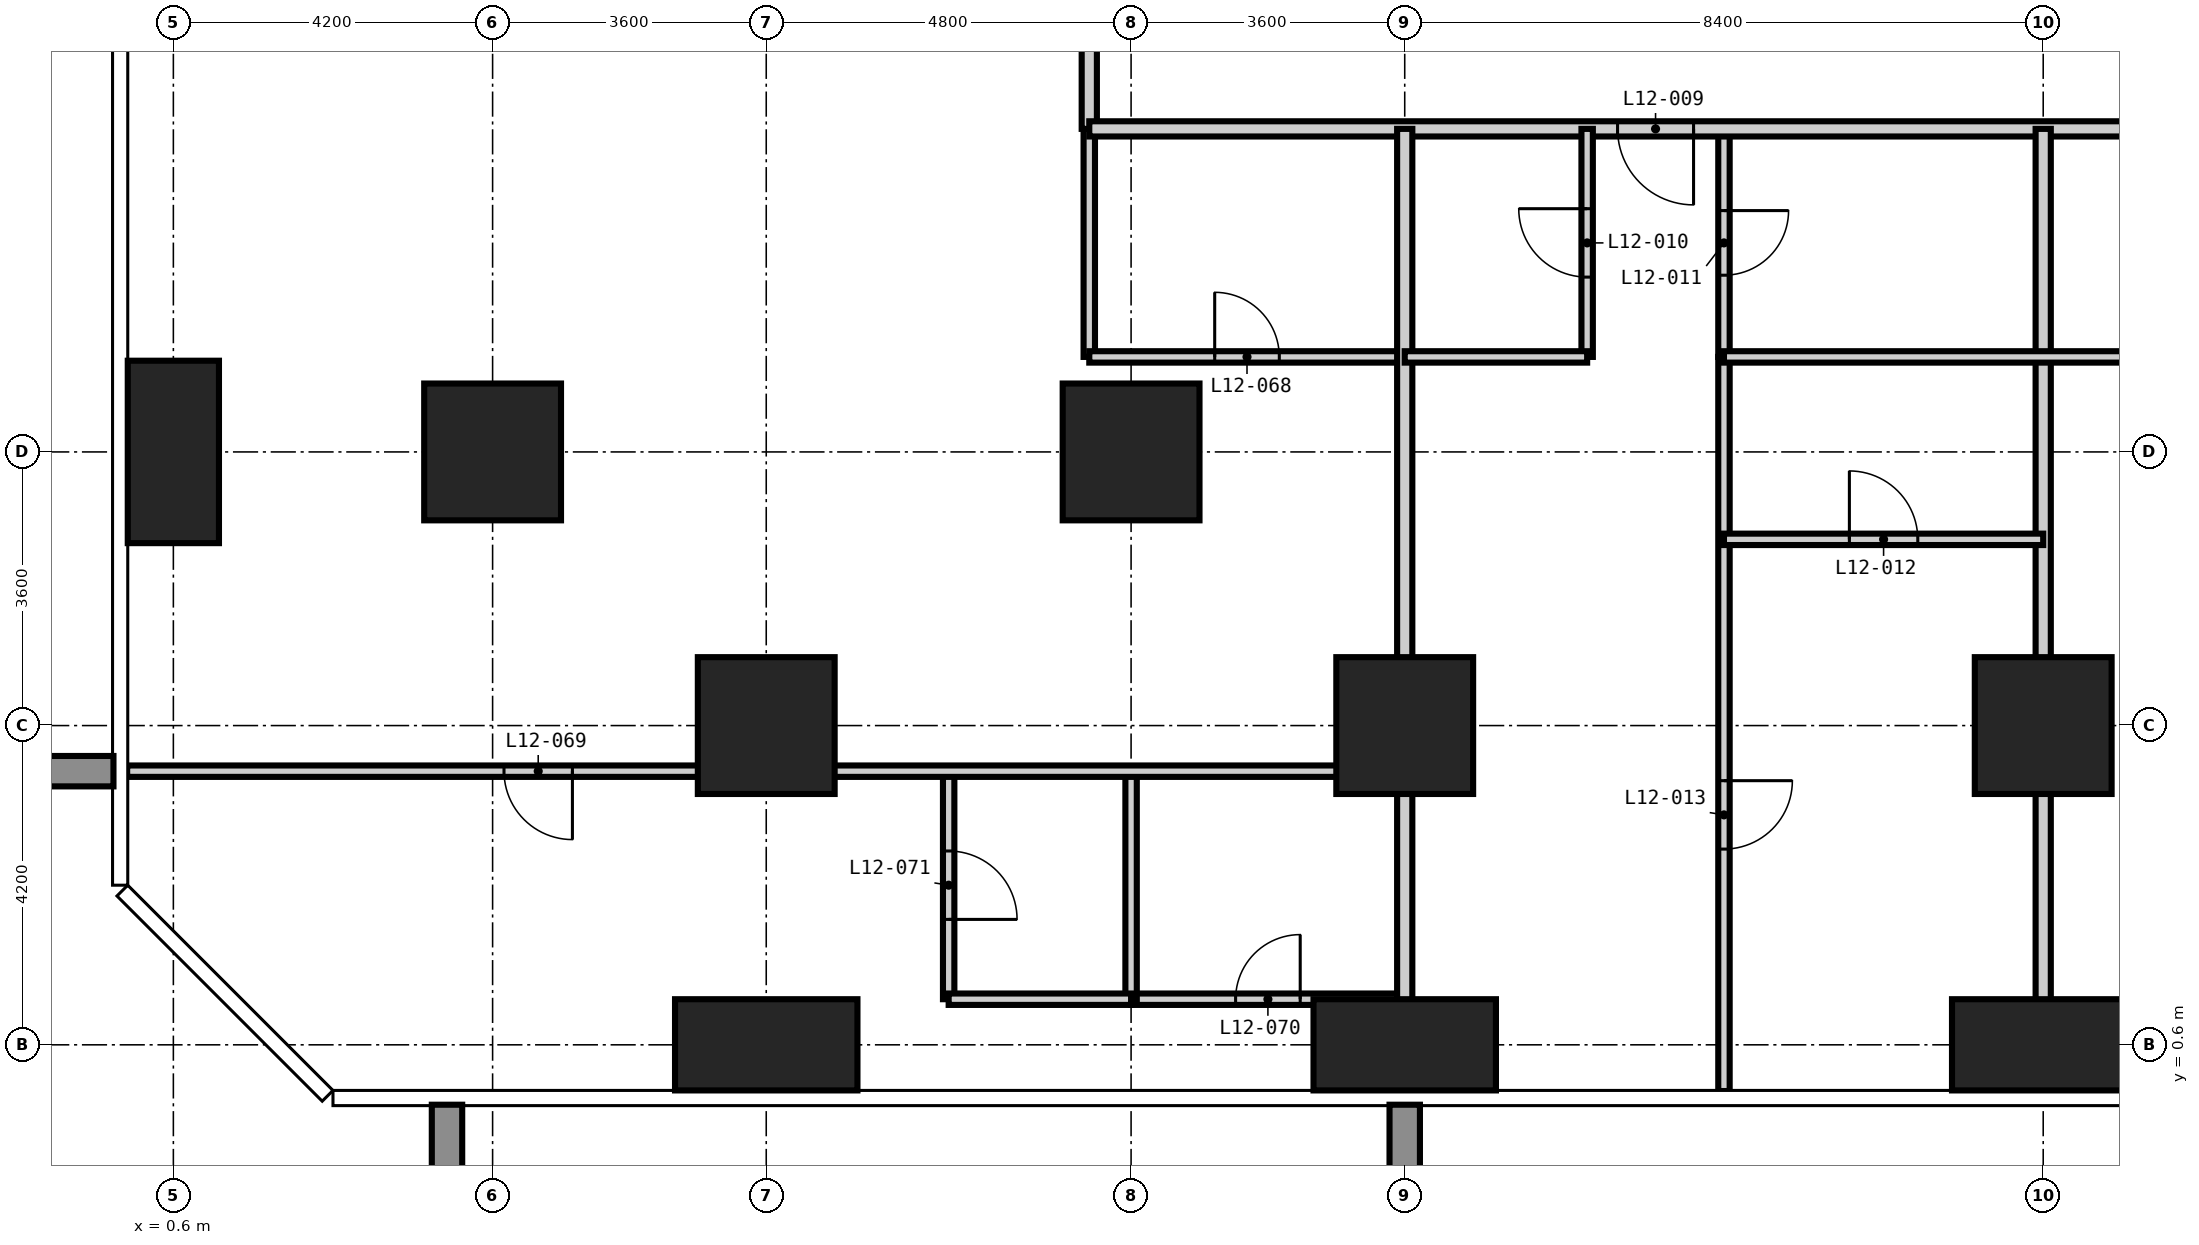
"""IFC4 building model, lengths in metres.
Left out: names, types, materials, properties, quantities, classifications, styles, units other than length and angle.
Written with IfcOpenShell. Run it as: python <this file> out.ifc"""

import sys

from ifc_helpers import new_model, si_unit, direction, frame, frame_2d, origin, origin_2d, place, context, subcontext, project, spatial, rectangle, extrude, element, fill, save


model = new_model("IFC4")
c1 = context("Model", 3, precision=1e-05, world=origin(), true_north=direction((0.0, 1.0)))
c2 = subcontext(c1, "Body", "Model", "MODEL_VIEW")
j1 = project(units=[si_unit("LENGTHUNIT", "METRE"), si_unit("PLANEANGLEUNIT", "RADIAN")], contexts=[c1])
p1 = place(None, origin())
s1 = spatial("IfcSite", under=j1, at=p1, CompositionType="ELEMENT")
p2 = place(p1, origin())
s2 = spatial("IfcBuilding", under=s1, at=p2, CompositionType="ELEMENT")
p3 = place(p2, frame((0.0, 0.0, 52.2)))
s3 = spatial("IfcBuildingStorey", under=s2, at=p3, CompositionType="ELEMENT", Elevation=52.2)
p4 = place(p3, frame((0.6, 8.4, -0.35), z_axis=(0.0, 0.0, 1.0), x_axis=(1.0, 0.0, 0.0)))
e1 = element("IfcColumn", 1, at=p4, inside=s3, PredefinedType="COLUMN", context=c2, shape_type="SweptSolid", body=[
    extrude(rectangle(XDim=1.2, YDim=2.4, at=origin_2d()), origin(), (0.0, 0.0, 1.0), 3.6),
])
p5 = place(p3, frame((4.8, 8.4, -0.35), z_axis=(0.0, 0.0, 1.0), x_axis=(1.0, 0.0, 0.0)))
e2 = element("IfcColumn", 2, at=p5, inside=s3, PredefinedType="COLUMN", context=c2, shape_type="SweptSolid", body=[
    extrude(rectangle(XDim=1.8, YDim=1.8, at=origin_2d()), origin(), (0.0, 0.0, 1.0), 3.6),
])
p6 = place(p3, frame((8.4, 0.6, -0.35), z_axis=(0.0, 0.0, 1.0), x_axis=(1.0, 0.0, 0.0)))
e3 = element("IfcColumn", 3, at=p6, inside=s3, PredefinedType="COLUMN", context=c2, shape_type="SweptSolid", body=[
    extrude(rectangle(XDim=2.4, YDim=1.2, at=origin_2d()), origin(), (0.0, 0.0, 1.0), 3.6),
])
for number, where, z_axis, x_axis in (
    (4, (8.4, 4.8, -0.35), (0.0, 0.0, 1.0), (1.0, 0.0, 0.0)),
    (5, (13.2, 8.4, -0.35), (0.0, 0.0, 1.0), (1.0, 0.0, 0.0)),
):
    element("IfcColumn", number, at=place(p3, frame(where, z_axis=z_axis, x_axis=x_axis)), inside=s3, PredefinedType="COLUMN", context=c2, shape_type="SweptSolid", body=[
        extrude(rectangle(XDim=1.8, YDim=1.8, at=origin_2d()), origin(), (0.0, 0.0, 1.0), 3.6),
    ])
p7 = place(p3, frame((16.8, 0.6, -0.35), z_axis=(0.0, 0.0, 1.0), x_axis=(1.0, 0.0, 0.0)))
e6 = element("IfcColumn", 6, at=p7, inside=s3, PredefinedType="COLUMN", context=c2, shape_type="SweptSolid", body=[
    extrude(rectangle(XDim=2.4, YDim=1.2, at=origin_2d()), origin(), (0.0, 0.0, 1.0), 3.6),
])
p8 = place(p3, frame((16.8, 4.8, -0.35), z_axis=(0.0, 0.0, 1.0), x_axis=(1.0, 0.0, 0.0)))
e7 = element("IfcColumn", 7, at=p8, inside=s3, PredefinedType="COLUMN", context=c2, shape_type="SweptSolid", body=[
    extrude(rectangle(XDim=1.8, YDim=1.8, at=origin_2d()), origin(), (0.0, 0.0, 1.0), 3.6),
])
p9 = place(p3, frame((25.2, 0.6, -0.35), z_axis=(0.0, 0.0, 1.0), x_axis=(1.0, 0.0, 0.0)))
e8 = element("IfcColumn", 8, at=p9, inside=s3, PredefinedType="COLUMN", context=c2, shape_type="SweptSolid", body=[
    extrude(rectangle(XDim=2.4, YDim=1.2, at=origin_2d()), origin(), (0.0, 0.0, 1.0), 3.6),
])
p10 = place(p3, frame((25.2, 4.8, -0.35), z_axis=(0.0, 0.0, 1.0), x_axis=(1.0, 0.0, 0.0)))
e9 = element("IfcColumn", 9, at=p10, inside=s3, PredefinedType="COLUMN", context=c2, shape_type="SweptSolid", body=[
    extrude(rectangle(XDim=1.8, YDim=1.8, at=origin_2d()), origin(), (0.0, 0.0, 1.0), 3.6),
])
p11 = place(p3, frame((12.65, 9.65, 0.0), z_axis=(0.0, 0.0, 1.0), x_axis=(0.0, 1.0, 0.0)))
e10 = element("IfcWall", 10, at=p11, inside=s3, PredefinedType="PARTITIONING", context=c2, shape_type="SweptSolid", body=[
    extrude(rectangle(XDim=3.0, YDim=0.15, at=frame_2d((1.5, 0.0))), origin(), (0.0, 0.0, 1.0), 3.25),
])
p12 = place(p3, frame((21.0, 9.65, 0.0), z_axis=(0.0, 0.0, 1.0), x_axis=(0.0, 1.0, 0.0)))
e11 = element("IfcWall", 11, at=p12, inside=s3, PredefinedType="PARTITIONING", context=c2, shape_type="SweptSolid", body=[
    extrude(rectangle(XDim=3.0, YDim=0.15, at=frame_2d((1.5, 0.0))), origin(), (0.0, 0.0, 1.0), 3.25),
])
p13 = place(p12, frame((1.075, 0.0, 0.0)))
e12 = element("IfcOpeningElement", 12, at=p13, cuts=e11, PredefinedType="OPENING", context=c2, shape_type="SweptSolid", body=[
    extrude(rectangle(XDim=0.85, YDim=2.1, at=frame_2d((0.425, 1.05))), frame((0.0, 0.085, 0.0), z_axis=(0.0, -1.0, 0.0), x_axis=(1.0, 0.0, 0.0)), (0.0, 0.0, 1.0), 0.17),
])
p14 = place(p3, frame((13.2, 1.2, 0.0), z_axis=(0.0, 0.0, 1.0), x_axis=(1.0, 0.0, 0.0)))
e13 = element("IfcWall", 13, at=p14, inside=s3, PredefinedType="PARTITIONING", context=c2, shape_type="SweptSolid", body=[
    extrude(rectangle(XDim=3.6, YDim=0.15, at=frame_2d((1.8, 0.0))), origin(), (0.0, 0.0, 1.0), 3.25),
])
p15 = place(p14, frame((1.375, 0.0, 0.0)))
e14 = element("IfcOpeningElement", 14, at=p15, cuts=e13, PredefinedType="OPENING", context=c2, shape_type="SweptSolid", body=[
    extrude(rectangle(XDim=0.85, YDim=2.1, at=frame_2d((0.425, 1.05))), frame((0.0, 0.085, 0.0), z_axis=(0.0, -1.0, 0.0), x_axis=(1.0, 0.0, 0.0)), (0.0, 0.0, 1.0), 0.17),
])
p16 = place(p3, frame((12.65, 9.65, 0.0), z_axis=(0.0, 0.0, 1.0), x_axis=(1.0, 0.0, 0.0)))
e15 = element("IfcWall", 15, at=p16, inside=s3, PredefinedType="PARTITIONING", context=c2, shape_type="SweptSolid", body=[
    extrude(rectangle(XDim=4.15, YDim=0.15, at=frame_2d((2.075, 0.0))), origin(), (0.0, 0.0, 1.0), 3.25),
])
p17 = place(p16, frame((1.65, 0.0, 0.0)))
e16 = element("IfcOpeningElement", 16, at=p17, cuts=e15, PredefinedType="OPENING", context=c2, shape_type="SweptSolid", body=[
    extrude(rectangle(XDim=0.85, YDim=2.1, at=frame_2d((0.425, 1.05))), frame((0.0, 0.085, 0.0), z_axis=(0.0, -1.0, 0.0), x_axis=(1.0, 0.0, 0.0)), (0.0, 0.0, 1.0), 0.17),
])
p18 = place(p3, frame((12.65, 12.65, 0.0), z_axis=(0.0, 0.0, 1.0), x_axis=(0.0, 1.0, 0.0)))
e17 = element("IfcWall", 17, at=p18, inside=s3, PredefinedType="PARTITIONING", context=c2, shape_type="SweptSolid", body=[
    extrude(rectangle(XDim=32.9, YDim=0.2, at=frame_2d((16.45, 0.0))), origin(), (0.0, 0.0, 1.0), 3.25),
])
p19 = place(p18, frame((8.75, 0.0, 0.0)))
e18 = element("IfcOpeningElement", 18, at=p19, cuts=e17, PredefinedType="OPENING", context=c2, shape_type="SweptSolid", body=[
    extrude(rectangle(XDim=1.0, YDim=2.2, at=frame_2d((0.5, 1.1))), frame((0.0, 0.11, 0.0), z_axis=(0.0, -1.0, 0.0), x_axis=(1.0, 0.0, 0.0)), (0.0, 0.0, 1.0), 0.22),
])
p20 = place(p18, frame((17.0, 0.0, 0.0)))
e19 = element("IfcOpeningElement", 19, at=p20, cuts=e17, PredefinedType="OPENING", context=c2, shape_type="SweptSolid", body=[
    extrude(rectangle(XDim=1.0, YDim=2.2, at=frame_2d((0.5, 1.1))), frame((0.0, 0.11, 0.0), z_axis=(0.0, -1.0, 0.0), x_axis=(1.0, 0.0, 0.0)), (0.0, 0.0, 1.0), 0.22),
])
p21 = place(p18, frame((23.9, 0.0, 0.0)))
e20 = element("IfcOpeningElement", 20, at=p21, cuts=e17, PredefinedType="OPENING", context=c2, shape_type="SweptSolid", body=[
    extrude(rectangle(XDim=1.0, YDim=2.2, at=frame_2d((0.5, 1.1))), frame((0.0, 0.11, 0.0), z_axis=(0.0, -1.0, 0.0), x_axis=(1.0, 0.0, 0.0)), (0.0, 0.0, 1.0), 0.22),
])
p22 = place(p18, frame((25.4, 0.0, 0.0)))
e21 = element("IfcOpeningElement", 21, at=p22, cuts=e17, PredefinedType="OPENING", context=c2, shape_type="SweptSolid", body=[
    extrude(rectangle(XDim=1.0, YDim=2.2, at=frame_2d((0.5, 1.1))), frame((0.0, 0.11, 0.0), z_axis=(0.0, -1.0, 0.0), x_axis=(1.0, 0.0, 0.0)), (0.0, 0.0, 1.0), 0.22),
])
p23 = place(p18, frame((1.575, 0.0, 0.0)))
e22 = element("IfcOpeningElement", 22, at=p23, cuts=e17, PredefinedType="OPENING", context=c2, shape_type="SweptSolid", body=[
    extrude(rectangle(XDim=1.0, YDim=2.2, at=frame_2d((0.5, 1.1))), frame((0.0, 0.11, 0.0), z_axis=(0.0, -1.0, 0.0), x_axis=(1.0, 0.0, 0.0)), (0.0, 0.0, 1.0), 0.22),
])
p24 = place(p18, frame((30.625, 0.0, 0.0)))
e23 = element("IfcOpeningElement", 23, at=p24, cuts=e17, PredefinedType="OPENING", context=c2, shape_type="SweptSolid", body=[
    extrude(rectangle(XDim=1.0, YDim=2.2, at=frame_2d((0.5, 1.1))), frame((0.0, 0.11, 0.0), z_axis=(0.0, -1.0, 0.0), x_axis=(1.0, 0.0, 0.0)), (0.0, 0.0, 1.0), 0.22),
])
p25 = place(p3, frame((44.95, 12.65, 0.0), z_axis=(0.0, 0.0, 1.0), x_axis=(-1.0, 0.0, 0.0)))
e24 = element("IfcWall", 24, at=p25, inside=s3, PredefinedType="PARTITIONING", context=c2, shape_type="SweptSolid", body=[
    extrude(rectangle(XDim=32.3, YDim=0.2, at=frame_2d((16.15, 0.0))), origin(), (0.0, 0.0, 1.0), 3.25),
])
p26 = place(p25, frame((24.35, 0.0, 0.0)))
e25 = element("IfcOpeningElement", 25, at=p26, cuts=e24, PredefinedType="OPENING", context=c2, shape_type="SweptSolid", body=[
    extrude(rectangle(XDim=1.0, YDim=2.2, at=frame_2d((0.5, 1.1))), frame((0.0, 0.11, 0.0), z_axis=(0.0, -1.0, 0.0), x_axis=(1.0, 0.0, 0.0)), (0.0, 0.0, 1.0), 0.22),
])
p27 = place(p25, frame((15.95, 0.0, 0.0)))
e26 = element("IfcOpeningElement", 26, at=p27, cuts=e24, PredefinedType="OPENING", context=c2, shape_type="SweptSolid", body=[
    extrude(rectangle(XDim=1.0, YDim=2.2, at=frame_2d((0.5, 1.1))), frame((0.0, 0.11, 0.0), z_axis=(0.0, -1.0, 0.0), x_axis=(1.0, 0.0, 0.0)), (0.0, 0.0, 1.0), 0.22),
])
p28 = place(p25, frame((7.55, 0.0, 0.0)))
e27 = element("IfcOpeningElement", 27, at=p28, cuts=e24, PredefinedType="OPENING", context=c2, shape_type="SweptSolid", body=[
    extrude(rectangle(XDim=1.0, YDim=2.2, at=frame_2d((0.5, 1.1))), frame((0.0, 0.11, 0.0), z_axis=(0.0, -1.0, 0.0), x_axis=(1.0, 0.0, 0.0)), (0.0, 0.0, 1.0), 0.22),
])
for number, where, z_axis, x_axis in (
    (28, (16.8, -0.008, 0.0), (0.0, 0.0, 1.0), (0.0, 1.0, 0.0)),
    (29, (25.2, -0.008, 0.0), (0.0, 0.0, 1.0), (0.0, 1.0, 0.0)),
):
    element("IfcWall", number, at=place(p3, frame(where, z_axis=z_axis, x_axis=x_axis)), inside=s3, PredefinedType="PARTITIONING", context=c2, shape_type="SweptSolid", body=[
        extrude(rectangle(XDim=12.658, YDim=0.2, at=frame_2d((6.329, 0.0))), origin(), (0.0, 0.0, 1.0), 3.25),
    ])
p29 = place(p3, frame((10.8, 1.2, 0.0), z_axis=(0.0, 0.0, 1.0), x_axis=(0.0, 1.0, 0.0)))
e30 = element("IfcWall", 30, at=p29, inside=s3, PredefinedType="PARTITIONING", context=c2, shape_type="SweptSolid", body=[
    extrude(rectangle(XDim=3.0, YDim=0.15, at=frame_2d((1.5, 0.0))), origin(), (0.0, 0.0, 1.0), 3.25),
])
p30 = place(p29, frame((1.05, 0.0, 0.0)))
e31 = element("IfcOpeningElement", 31, at=p30, cuts=e30, PredefinedType="OPENING", context=c2, shape_type="SweptSolid", body=[
    extrude(rectangle(XDim=0.9, YDim=2.1, at=frame_2d((0.45, 1.05))), frame((0.0, 0.085, 0.0), z_axis=(0.0, -1.0, 0.0), x_axis=(1.0, 0.0, 0.0)), (0.0, 0.0, 1.0), 0.17),
])
p31 = place(p3, frame((13.2, 1.2, 0.0), z_axis=(0.0, 0.0, 1.0), x_axis=(0.0, 1.0, 0.0)))
e32 = element("IfcWall", 32, at=p31, inside=s3, PredefinedType="PARTITIONING", context=c2, shape_type="SweptSolid", body=[
    extrude(rectangle(XDim=3.0, YDim=0.15, at=frame_2d((1.5, 0.0))), origin(), (0.0, 0.0, 1.0), 3.25),
])
p32 = place(p3, frame((19.2, 9.65, 0.0), z_axis=(0.0, 0.0, 1.0), x_axis=(0.0, 1.0, 0.0)))
e33 = element("IfcWall", 33, at=p32, inside=s3, PredefinedType="PARTITIONING", context=c2, shape_type="SweptSolid", body=[
    extrude(rectangle(XDim=3.0, YDim=0.15, at=frame_2d((1.5, 0.0))), origin(), (0.0, 0.0, 1.0), 3.25),
])
p33 = place(p32, frame((1.05, 0.0, 0.0)))
e34 = element("IfcOpeningElement", 34, at=p33, cuts=e33, PredefinedType="OPENING", context=c2, shape_type="SweptSolid", body=[
    extrude(rectangle(XDim=0.9, YDim=2.1, at=frame_2d((0.45, 1.05))), frame((0.0, 0.085, 0.0), z_axis=(0.0, -1.0, 0.0), x_axis=(1.0, 0.0, 0.0)), (0.0, 0.0, 1.0), 0.17),
])
p34 = place(p3, frame((21.0, -0.008, 0.0), z_axis=(0.0, 0.0, 1.0), x_axis=(0.0, 1.0, 0.0)))
e35 = element("IfcWall", 35, at=p34, inside=s3, PredefinedType="PARTITIONING", context=c2, shape_type="SweptSolid", body=[
    extrude(rectangle(XDim=9.658, YDim=0.15, at=frame_2d((4.829, 0.0))), origin(), (0.0, 0.0, 1.0), 3.25),
])
p35 = place(p34, frame((3.183, 0.0, 0.0)))
e36 = element("IfcOpeningElement", 36, at=p35, cuts=e35, PredefinedType="OPENING", context=c2, shape_type="SweptSolid", body=[
    extrude(rectangle(XDim=0.9, YDim=2.1, at=frame_2d((0.45, 1.05))), frame((0.0, 0.085, 0.0), z_axis=(0.0, -1.0, 0.0), x_axis=(1.0, 0.0, 0.0)), (0.0, 0.0, 1.0), 0.17),
])
p36 = place(p3, frame((10.8, 1.2, 0.0), z_axis=(0.0, 0.0, 1.0), x_axis=(1.0, 0.0, 0.0)))
e37 = element("IfcWall", 37, at=p36, inside=s3, PredefinedType="PARTITIONING", context=c2, shape_type="SweptSolid", body=[
    extrude(rectangle(XDim=2.4, YDim=0.15, at=frame_2d((1.2, 0.0))), origin(), (0.0, 0.0, 1.0), 3.25),
])
p37 = place(p3, frame((-0.008, 4.2, 0.0), z_axis=(0.0, 0.0, 1.0), x_axis=(1.0, 0.0, 0.0)))
e38 = element("IfcWall", 38, at=p37, inside=s3, PredefinedType="PARTITIONING", context=c2, shape_type="SweptSolid", body=[
    extrude(rectangle(XDim=16.808, YDim=0.15, at=frame_2d((8.404, 0.0))), origin(), (0.0, 0.0, 1.0), 3.25),
])
p38 = place(p37, frame((4.958, 0.0, 0.0)))
e39 = element("IfcOpeningElement", 39, at=p38, cuts=e38, PredefinedType="OPENING", context=c2, shape_type="SweptSolid", body=[
    extrude(rectangle(XDim=0.9, YDim=2.1, at=frame_2d((0.45, 1.05))), frame((0.0, 0.085, 0.0), z_axis=(0.0, -1.0, 0.0), x_axis=(1.0, 0.0, 0.0)), (0.0, 0.0, 1.0), 0.17),
])
p39 = place(p3, frame((21.0, 7.25, 0.0), z_axis=(0.0, 0.0, 1.0), x_axis=(1.0, 0.0, 0.0)))
e40 = element("IfcWall", 40, at=p39, inside=s3, PredefinedType="PARTITIONING", context=c2, shape_type="SweptSolid", body=[
    extrude(rectangle(XDim=4.2, YDim=0.15, at=frame_2d((2.1, 0.0))), origin(), (0.0, 0.0, 1.0), 3.25),
])
p40 = place(p39, frame((1.65, 0.0, 0.0)))
e41 = element("IfcOpeningElement", 41, at=p40, cuts=e40, PredefinedType="OPENING", context=c2, shape_type="SweptSolid", body=[
    extrude(rectangle(XDim=0.9, YDim=2.1, at=frame_2d((0.45, 1.05))), frame((0.0, 0.085, 0.0), z_axis=(0.0, -1.0, 0.0), x_axis=(1.0, 0.0, 0.0)), (0.0, 0.0, 1.0), 0.17),
])
p41 = place(p3, frame((16.8, 9.65, 0.0), z_axis=(0.0, 0.0, 1.0), x_axis=(1.0, 0.0, 0.0)))
e42 = element("IfcWall", 42, at=p41, inside=s3, PredefinedType="PARTITIONING", context=c2, shape_type="SweptSolid", body=[
    extrude(rectangle(XDim=2.4, YDim=0.15, at=frame_2d((1.2, 0.0))), origin(), (0.0, 0.0, 1.0), 3.25),
])
p42 = place(p3, frame((21.0, 9.65, 0.0), z_axis=(0.0, 0.0, 1.0), x_axis=(1.0, 0.0, 0.0)))
e43 = element("IfcWall", 43, at=p42, inside=s3, PredefinedType="PARTITIONING", context=c2, shape_type="SweptSolid", body=[
    extrude(rectangle(XDim=6.6, YDim=0.15, at=frame_2d((3.3, 0.0))), origin(), (0.0, 0.0, 1.0), 3.25),
])
p43 = place(p26, origin())
e44 = element("IfcDoor", 44, at=p43, inside=s3, OperationType="SINGLE_SWING_LEFT", PredefinedType="DOOR", context=c2, shape_type="SweptSolid", body=[
    extrude(rectangle(XDim=1.0, YDim=2.2, at=frame_2d((0.5, 1.1))), frame((0.0, 0.025, 0.0), z_axis=(0.0, -1.0, 0.0), x_axis=(1.0, 0.0, 0.0)), (0.0, 0.0, 1.0), 0.05),
])
fill(e25, e44)
p44 = place(p33, origin())
e45 = element("IfcDoor", 45, at=p44, inside=s3, OperationType="SINGLE_SWING_RIGHT", PredefinedType="DOOR", context=c2, shape_type="SweptSolid", body=[
    extrude(rectangle(XDim=0.9, YDim=2.1, at=frame_2d((0.45, 1.05))), frame((0.0, 0.025, 0.0), z_axis=(0.0, -1.0, 0.0), x_axis=(1.0, 0.0, 0.0)), (0.0, 0.0, 1.0), 0.05),
])
fill(e34, e45)
p45 = place(p13, frame((0.85, 0.0, 0.0), z_axis=(0.0, 0.0, 1.0), x_axis=(-1.0, 0.0, 0.0)))
e46 = element("IfcDoor", 46, at=p45, inside=s3, OperationType="SINGLE_SWING_LEFT", PredefinedType="DOOR", context=c2, shape_type="SweptSolid", body=[
    extrude(rectangle(XDim=0.85, YDim=2.1, at=frame_2d((0.425, 1.05))), frame((0.0, 0.025, 0.0), z_axis=(0.0, -1.0, 0.0), x_axis=(1.0, 0.0, 0.0)), (0.0, 0.0, 1.0), 0.05),
])
fill(e12, e46)
p46 = place(p40, origin())
e47 = element("IfcDoor", 47, at=p46, inside=s3, OperationType="SINGLE_SWING_LEFT", PredefinedType="DOOR", context=c2, shape_type="SweptSolid", body=[
    extrude(rectangle(XDim=0.9, YDim=2.1, at=frame_2d((0.45, 1.05))), frame((0.0, 0.025, 0.0), z_axis=(0.0, -1.0, 0.0), x_axis=(1.0, 0.0, 0.0)), (0.0, 0.0, 1.0), 0.05),
])
fill(e41, e47)
p47 = place(p35, frame((0.9, 0.0, 0.0), z_axis=(0.0, 0.0, 1.0), x_axis=(-1.0, 0.0, 0.0)))
e48 = element("IfcDoor", 48, at=p47, inside=s3, OperationType="SINGLE_SWING_LEFT", PredefinedType="DOOR", context=c2, shape_type="SweptSolid", body=[
    extrude(rectangle(XDim=0.9, YDim=2.1, at=frame_2d((0.45, 1.05))), frame((0.0, 0.025, 0.0), z_axis=(0.0, -1.0, 0.0), x_axis=(1.0, 0.0, 0.0)), (0.0, 0.0, 1.0), 0.05),
])
fill(e36, e48)
p48 = place(p17, origin())
e49 = element("IfcDoor", 49, at=p48, inside=s3, OperationType="SINGLE_SWING_LEFT", PredefinedType="DOOR", context=c2, shape_type="SweptSolid", body=[
    extrude(rectangle(XDim=0.85, YDim=2.1, at=frame_2d((0.425, 1.05))), frame((0.0, 0.025, 0.0), z_axis=(0.0, -1.0, 0.0), x_axis=(1.0, 0.0, 0.0)), (0.0, 0.0, 1.0), 0.05),
])
fill(e16, e49)
p49 = place(p38, frame((0.9, 0.0, 0.0), z_axis=(0.0, 0.0, 1.0), x_axis=(-1.0, 0.0, 0.0)))
e50 = element("IfcDoor", 50, at=p49, inside=s3, OperationType="SINGLE_SWING_LEFT", PredefinedType="DOOR", context=c2, shape_type="SweptSolid", body=[
    extrude(rectangle(XDim=0.9, YDim=2.1, at=frame_2d((0.45, 1.05))), frame((0.0, 0.025, 0.0), z_axis=(0.0, -1.0, 0.0), x_axis=(1.0, 0.0, 0.0)), (0.0, 0.0, 1.0), 0.05),
])
fill(e39, e50)
p50 = place(p15, origin())
e51 = element("IfcDoor", 51, at=p50, inside=s3, OperationType="SINGLE_SWING_RIGHT", PredefinedType="DOOR", context=c2, shape_type="SweptSolid", body=[
    extrude(rectangle(XDim=0.85, YDim=2.1, at=frame_2d((0.425, 1.05))), frame((0.0, 0.025, 0.0), z_axis=(0.0, -1.0, 0.0), x_axis=(1.0, 0.0, 0.0)), (0.0, 0.0, 1.0), 0.05),
])
fill(e14, e51)
p51 = place(p30, frame((0.9, 0.0, 0.0), z_axis=(0.0, 0.0, 1.0), x_axis=(-1.0, 0.0, 0.0)))
e52 = element("IfcDoor", 52, at=p51, inside=s3, OperationType="SINGLE_SWING_RIGHT", PredefinedType="DOOR", context=c2, shape_type="SweptSolid", body=[
    extrude(rectangle(XDim=0.9, YDim=2.1, at=frame_2d((0.45, 1.05))), frame((0.0, 0.025, 0.0), z_axis=(0.0, -1.0, 0.0), x_axis=(1.0, 0.0, 0.0)), (0.0, 0.0, 1.0), 0.05),
])
fill(e31, e52)
save(model, sys.argv[1])
